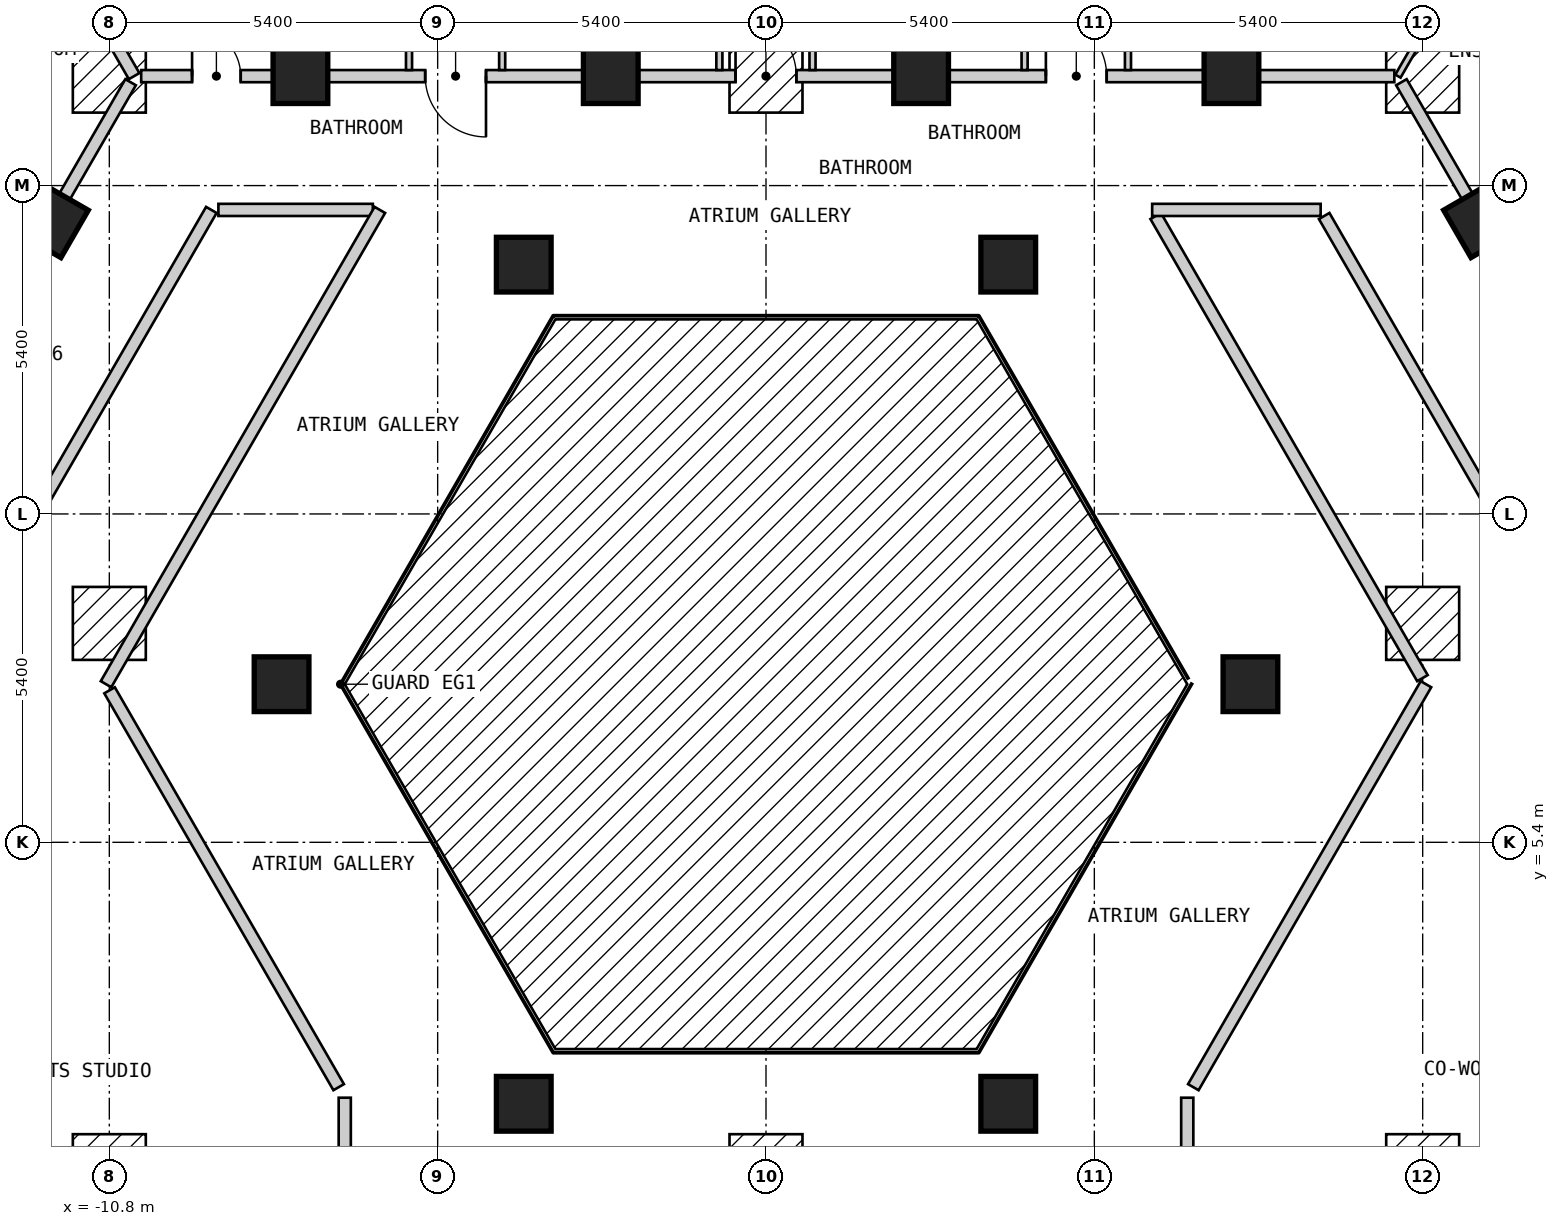
"""IFC4 building model, lengths in metres.
Left out: names, types, materials, properties, quantities, classifications, styles, units other than length and angle.
Written with IfcOpenShell. Run it as: python <this file> out.ifc"""

import sys

from ifc_helpers import new_model, si_unit, direction, frame, frame_2d, origin, origin_2d, place, context, subcontext, project, spatial, rectangle, extrude, element, fill, save


model = new_model("IFC4")
c1 = context("Model", 3, precision=1e-05, world=origin(), true_north=direction((0.0, 1.0)))
c2 = subcontext(c1, "Body", "Model", "MODEL_VIEW")
j1 = project(units=[si_unit("LENGTHUNIT", "METRE"), si_unit("PLANEANGLEUNIT", "RADIAN")], contexts=[c1])
p1 = place(None, origin())
s1 = spatial("IfcSite", under=j1, at=p1, CompositionType="ELEMENT")
p2 = place(p1, origin())
s2 = spatial("IfcBuilding", under=s1, at=p2, CompositionType="ELEMENT")
p3 = place(p2, frame((0.0, 0.0, 23.4)))
s3 = spatial("IfcBuildingStorey", under=s2, at=p3, CompositionType="ELEMENT", Elevation=23.4)
for number, where, z_axis, x_axis in (
    (1, (3.984, 1.1, 0.0), (0.0, 0.0, 1.0), (1.0, 0.0, 0.0)),
    (2, (7.967, 8.0, 0.0), (0.0, 0.0, 1.0), (1.0, 0.0, 0.0)),
    (3, (11.76, 15.631, 0.0), (0.0, 0.0, 1.0), (-0.5, 0.866, 0.0)),
    (4, (7.655, 18.0, 0.0), (0.0, 0.0, 1.0), (-1.0, 0.0, 0.0)),
    (5, (3.984, 14.9, 0.0), (0.0, 0.0, 1.0), (1.0, 0.0, 0.0)),
    (6, (2.551, 18.0, 0.0), (0.0, 0.0, 1.0), (-1.0, 0.0, 0.0)),
    (7, (-2.553, 18.0, 0.0), (0.0, 0.0, 1.0), (-1.0, 0.0, 0.0)),
    (8, (-3.984, 14.9, 0.0), (0.0, 0.0, 1.0), (1.0, 0.0, 0.0)),
    (9, (-7.657, 18.0, 0.0), (0.0, 0.0, 1.0), (-1.0, 0.0, 0.0)),
    (10, (-11.761, 15.63, 0.0), (0.0, 0.0, 1.0), (-0.5, -0.866, 0.0)),
    (11, (-7.967, 8.0, 0.0), (0.0, 0.0, 1.0), (1.0, 0.0, 0.0)),
    (12, (-3.984, 1.1, 0.0), (0.0, 0.0, 1.0), (1.0, 0.0, 0.0)),
):
    element("IfcColumn", number, at=place(p3, frame(where, z_axis=z_axis, x_axis=x_axis)), inside=s3, PredefinedType="COLUMN", context=c2, shape_type="SweptSolid", body=[
        extrude(rectangle(XDim=0.9, YDim=0.9, at=origin_2d()), origin(), (0.0, 0.0, 1.0), 3.0),
    ])
p4 = place(p3, frame((-10.796, 7.9, 0.0), z_axis=(0.0, 0.0, 1.0), x_axis=(0.499954271211, -0.866051803703, 0.0)))
e13 = element("IfcWall", 13, at=p4, inside=s3, PredefinedType="PARTITIONING", context=c2, shape_type="SweptSolid", body=[
    extrude(rectangle(XDim=7.536, YDim=0.2, at=frame_2d((3.768, 0.0))), origin(), (0.0, 0.0, 1.0), 2.7),
])
p5 = place(p3, frame((6.409, 15.7, 0.0), z_axis=(0.0, 0.0, 1.0), x_axis=(0.499930377127, -0.866065596838, 0.0)))
e14 = element("IfcWall", 14, at=p5, inside=s3, PredefinedType="PARTITIONING", context=c2, shape_type="SweptSolid", body=[
    extrude(rectangle(XDim=8.775, YDim=0.2, at=frame_2d((4.388, 0.0))), origin(), (0.0, 0.0, 1.0), 2.7),
])
p6 = place(p3, frame((9.18, 15.7, 0.0), z_axis=(0.0, 0.0, 1.0), x_axis=(0.500003652032, -0.866023295272, 0.0)))
e15 = element("IfcWall", 15, at=p6, inside=s3, PredefinedType="PARTITIONING", context=c2, shape_type="SweptSolid", body=[
    extrude(rectangle(XDim=18.012, YDim=0.2, at=frame_2d((9.006, 0.0))), origin(), (0.0, 0.0, 1.0), 2.7),
])
p7 = place(p6, frame((8.556, 0.0, 0.0)))
e16 = element("IfcOpeningElement", 16, at=p7, cuts=e15, PredefinedType="OPENING", context=c2, shape_type="SweptSolid", body=[
    extrude(rectangle(XDim=0.9, YDim=2.1, at=frame_2d((0.45, 1.05))), frame((0.0, 0.11, 0.0), z_axis=(0.0, -1.0, 0.0), x_axis=(1.0, 0.0, 0.0)), (0.0, 0.0, 1.0), 0.22),
])
p8 = place(p3, frame((10.45, 17.9, 0.0), z_axis=(0.0, 0.0, 1.0), x_axis=(0.500034352617, -0.866005569383, 0.0)))
e17 = element("IfcWall", 17, at=p8, inside=s3, PredefinedType="PARTITIONING", context=c2, shape_type="SweptSolid", body=[
    extrude(rectangle(XDim=20.553, YDim=0.2, at=frame_2d((10.276, 0.0))), origin(), (0.0, 0.0, 1.0), 2.7),
])
p9 = place(p8, frame((14.903, 0.0, 0.0)))
e18 = element("IfcOpeningElement", 18, at=p9, cuts=e17, PredefinedType="OPENING", context=c2, shape_type="SweptSolid", body=[
    extrude(rectangle(XDim=1.0, YDim=2.1, at=frame_2d((0.5, 1.05))), frame((0.0, 0.11, 0.0), z_axis=(0.0, -1.0, 0.0), x_axis=(1.0, 0.0, 0.0)), (0.0, 0.0, 1.0), 0.22),
])
p10 = place(p8, frame((9.775, 0.0, 0.0)))
e19 = element("IfcOpeningElement", 19, at=p10, cuts=e17, PredefinedType="OPENING", context=c2, shape_type="SweptSolid", body=[
    extrude(rectangle(XDim=1.0, YDim=2.1, at=frame_2d((0.5, 1.05))), frame((0.0, 0.11, 0.0), z_axis=(0.0, -1.0, 0.0), x_axis=(1.0, 0.0, 0.0)), (0.0, 0.0, 1.0), 0.22),
])
p11 = place(p3, frame((-9.006, 15.8, 0.0), z_axis=(0.0, 0.0, 1.0), x_axis=(1.0, 0.0, 0.0)))
e20 = element("IfcWall", 20, at=p11, inside=s3, PredefinedType="PARTITIONING", context=c2, shape_type="SweptSolid", body=[
    extrude(rectangle(XDim=2.54, YDim=0.2, at=frame_2d((1.27, 0.0))), origin(), (0.0, 0.0, 1.0), 2.7),
])
p12 = place(p3, frame((6.351, 15.8, 0.0), z_axis=(0.0, 0.0, 1.0), x_axis=(1.0, 0.0, 0.0)))
e21 = element("IfcWall", 21, at=p12, inside=s3, PredefinedType="PARTITIONING", context=c2, shape_type="SweptSolid", body=[
    extrude(rectangle(XDim=2.771, YDim=0.2, at=frame_2d((1.385, 0.0))), origin(), (0.0, 0.0, 1.0), 2.7),
])
p13 = place(p3, frame((-10.276, 18.0, 0.0), z_axis=(0.0, 0.0, 1.0), x_axis=(1.0, 0.0, 0.0)))
e22 = element("IfcWall", 22, at=p13, inside=s3, PredefinedType="PARTITIONING", context=c2, shape_type="SweptSolid", body=[
    extrude(rectangle(XDim=20.61, YDim=0.2, at=frame_2d((10.305, 0.0))), origin(), (0.0, 0.0, 1.0), 2.7),
])
p14 = place(p13, frame((14.879, 0.0, 0.0)))
e23 = element("IfcOpeningElement", 23, at=p14, cuts=e22, PredefinedType="OPENING", context=c2, shape_type="SweptSolid", body=[
    extrude(rectangle(XDim=1.0, YDim=2.1, at=frame_2d((0.5, 1.05))), frame((0.0, 0.11, 0.0), z_axis=(0.0, -1.0, 0.0), x_axis=(1.0, 0.0, 0.0)), (0.0, 0.0, 1.0), 0.22),
])
p15 = place(p13, frame((9.775, 0.0, 0.0)))
e24 = element("IfcOpeningElement", 24, at=p15, cuts=e22, PredefinedType="OPENING", context=c2, shape_type="SweptSolid", body=[
    extrude(rectangle(XDim=1.0, YDim=2.1, at=frame_2d((0.5, 1.05))), frame((0.0, 0.11, 0.0), z_axis=(0.0, -1.0, 0.0), x_axis=(1.0, 0.0, 0.0)), (0.0, 0.0, 1.0), 0.22),
])
p16 = place(p13, frame((4.671, 0.0, 0.0)))
e25 = element("IfcOpeningElement", 25, at=p16, cuts=e22, PredefinedType="OPENING", context=c2, shape_type="SweptSolid", body=[
    extrude(rectangle(XDim=1.0, YDim=2.1, at=frame_2d((0.5, 1.05))), frame((0.0, 0.11, 0.0), z_axis=(0.0, -1.0, 0.0), x_axis=(1.0, 0.0, 0.0)), (0.0, 0.0, 1.0), 0.22),
])
p17 = place(p13, frame((0.837, 0.0, 0.0)))
e26 = element("IfcOpeningElement", 26, at=p17, cuts=e22, PredefinedType="OPENING", context=c2, shape_type="SweptSolid", body=[
    extrude(rectangle(XDim=0.8, YDim=2.1, at=frame_2d((0.4, 1.05))), frame((0.0, 0.11, 0.0), z_axis=(0.0, -1.0, 0.0), x_axis=(1.0, 0.0, 0.0)), (0.0, 0.0, 1.0), 0.22),
])
p18 = place(p3, frame((7.028, 1.373, 0.0), z_axis=(0.0, 0.0, 1.0), x_axis=(0.49998574534, 0.86603363356, 0.0)))
e27 = element("IfcWall", 27, at=p18, inside=s3, PredefinedType="PARTITIONING", context=c2, shape_type="SweptSolid", body=[
    extrude(rectangle(XDim=7.652, YDim=0.2, at=frame_2d((3.826, 0.0))), origin(), (0.0, 0.0, 1.0), 2.7),
])
p19 = place(p3, frame((-10.854, 8.0, 0.0), z_axis=(0.0, 0.0, 1.0), x_axis=(0.499964141897, 0.86604610548, 0.0)))
e28 = element("IfcWall", 28, at=p19, inside=s3, PredefinedType="PARTITIONING", context=c2, shape_type="SweptSolid", body=[
    extrude(rectangle(XDim=9.007, YDim=0.2, at=frame_2d((4.503, 0.0))), origin(), (0.0, 0.0, 1.0), 2.7),
])
p20 = place(p3, frame((-18.244, -0.001, 0.0), z_axis=(0.0, 0.0, 1.0), x_axis=(0.499962999376, 0.866046765051, 0.0)))
e29 = element("IfcWall", 29, at=p20, inside=s3, PredefinedType="PARTITIONING", context=c2, shape_type="SweptSolid", body=[
    extrude(rectangle(XDim=18.245, YDim=0.2, at=frame_2d((9.123, 0.0))), origin(), (0.0, 0.0, 1.0), 2.7),
])
p21 = place(p20, frame((8.672, 0.0, 0.0)))
e30 = element("IfcOpeningElement", 30, at=p21, cuts=e29, PredefinedType="OPENING", context=c2, shape_type="SweptSolid", body=[
    extrude(rectangle(XDim=0.9, YDim=2.1, at=frame_2d((0.45, 1.05))), frame((0.0, 0.11, 0.0), z_axis=(0.0, -1.0, 0.0), x_axis=(1.0, 0.0, 0.0)), (0.0, 0.0, 1.0), 0.22),
])
p22 = place(p3, frame((-20.727, 0.099, 0.0), z_axis=(0.0, 0.0, 1.0), x_axis=(0.499993204491, 0.866029327138, 0.0)))
e31 = element("IfcWall", 31, at=p22, inside=s3, PredefinedType="PARTITIONING", context=c2, shape_type="SweptSolid", body=[
    extrude(rectangle(XDim=20.554, YDim=0.2, at=frame_2d((10.277, 0.0))), origin(), (0.0, 0.0, 1.0), 2.7),
])
p23 = place(p22, frame((14.88, 0.0, 0.0)))
e32 = element("IfcOpeningElement", 32, at=p23, cuts=e31, PredefinedType="OPENING", context=c2, shape_type="SweptSolid", body=[
    extrude(rectangle(XDim=1.0, YDim=2.1, at=frame_2d((0.5, 1.05))), frame((0.0, 0.11, 0.0), z_axis=(0.0, -1.0, 0.0), x_axis=(1.0, 0.0, 0.0)), (0.0, 0.0, 1.0), 0.22),
])
p24 = place(p22, frame((4.673, 0.0, 0.0)))
e33 = element("IfcOpeningElement", 33, at=p24, cuts=e31, PredefinedType="OPENING", context=c2, shape_type="SweptSolid", body=[
    extrude(rectangle(XDim=1.0, YDim=2.1, at=frame_2d((0.5, 1.05))), frame((0.0, 0.11, 0.0), z_axis=(0.0, -1.0, 0.0), x_axis=(1.0, 0.0, 0.0)), (0.0, 0.0, 1.0), 0.22),
])
for number, where, z_axis, x_axis in (
    (34, (6.928, -2.8, 0.0), (0.0, 0.0, 1.0), (0.0, 1.0, 0.0)),
    (35, (-6.928, -2.8, 0.0), (0.0, 0.0, 1.0), (0.0, 1.0, 0.0)),
):
    element("IfcWall", number, at=place(p3, frame(where, z_axis=z_axis, x_axis=x_axis)), inside=s3, PredefinedType="PARTITIONING", context=c2, shape_type="SweptSolid", body=[
        extrude(rectangle(XDim=4.0, YDim=0.2, at=frame_2d((2.0, 0.0))), origin(), (0.0, 0.0, 1.0), 2.7),
    ])
p25 = place(p3, frame((-4.339, 20.609, 0.0), z_axis=(0.0, 0.0, 1.0), x_axis=(0.0, -1.0, 0.0)))
e36 = element("IfcWall", 36, at=p25, inside=s3, PredefinedType="PARTITIONING", context=c2, shape_type="SweptSolid", body=[
    extrude(rectangle(XDim=2.509, YDim=0.1, at=frame_2d((1.254, 0.0))), origin(), (0.0, 0.0, 1.0), 2.7),
])
p26 = place(p25, frame((0.829, 0.0, 0.0)))
e37 = element("IfcOpeningElement", 37, at=p26, cuts=e36, PredefinedType="OPENING", context=c2, shape_type="SweptSolid", body=[
    extrude(rectangle(XDim=0.9, YDim=2.1, at=frame_2d((0.45, 1.05))), frame((0.0, 0.06, 0.0), z_axis=(0.0, -1.0, 0.0), x_axis=(1.0, 0.0, 0.0)), (0.0, 0.0, 1.0), 0.12),
])
p27 = place(p3, frame((10.393, 18.0, 0.0), z_axis=(0.0, 0.0, 1.0), x_axis=(0.499945497007, 0.866056868816, 0.0)))
e38 = element("IfcWall", 38, at=p27, inside=s3, PredefinedType="PARTITIONING", context=c2, shape_type="SweptSolid", body=[
    extrude(rectangle(XDim=10.265, YDim=0.1, at=frame_2d((5.132, 0.0))), origin(), (0.0, 0.0, 1.0), 2.7),
])
p28 = place(p27, frame((7.108, 0.0, 0.0)))
e39 = element("IfcOpeningElement", 39, at=p28, cuts=e38, PredefinedType="OPENING", context=c2, shape_type="SweptSolid", body=[
    extrude(rectangle(XDim=0.9, YDim=2.1, at=frame_2d((0.45, 1.05))), frame((0.0, 0.06, 0.0), z_axis=(0.0, -1.0, 0.0), x_axis=(1.0, 0.0, 0.0)), (0.0, 0.0, 1.0), 0.12),
])
p29 = place(p3, frame((4.253, 18.1, 0.0), z_axis=(0.0, 0.0, 1.0), x_axis=(0.0, 1.0, 0.0)))
e40 = element("IfcWall", 40, at=p29, inside=s3, PredefinedType="PARTITIONING", context=c2, shape_type="SweptSolid", body=[
    extrude(rectangle(XDim=4.05, YDim=0.1, at=frame_2d((2.025, 0.0))), origin(), (0.0, 0.0, 1.0), 2.7),
])
p30 = place(p29, frame((1.6, 0.0, 0.0)))
e41 = element("IfcOpeningElement", 41, at=p30, cuts=e40, PredefinedType="OPENING", context=c2, shape_type="SweptSolid", body=[
    extrude(rectangle(XDim=0.8, YDim=2.1, at=frame_2d((0.4, 1.05))), frame((0.0, 0.06, 0.0), z_axis=(0.0, -1.0, 0.0), x_axis=(1.0, 0.0, 0.0)), (0.0, 0.0, 1.0), 0.12),
])
p31 = place(p3, frame((5.953, 18.1, 0.0), z_axis=(0.0, 0.0, 1.0), x_axis=(0.0, 1.0, 0.0)))
e42 = element("IfcWall", 42, at=p31, inside=s3, PredefinedType="PARTITIONING", context=c2, shape_type="SweptSolid", body=[
    extrude(rectangle(XDim=4.05, YDim=0.1, at=frame_2d((2.025, 0.0))), origin(), (0.0, 0.0, 1.0), 2.7),
])
p32 = place(p31, frame((1.55, 0.0, 0.0)))
e43 = element("IfcOpeningElement", 43, at=p32, cuts=e42, PredefinedType="OPENING", context=c2, shape_type="SweptSolid", body=[
    extrude(rectangle(XDim=0.9, YDim=2.1, at=frame_2d((0.45, 1.05))), frame((0.0, 0.06, 0.0), z_axis=(0.0, -1.0, 0.0), x_axis=(1.0, 0.0, 0.0)), (0.0, 0.0, 1.0), 0.12),
])
p33 = place(p3, frame((0.765, 18.1, 0.0), z_axis=(0.0, 0.0, 1.0), x_axis=(0.0, 1.0, 0.0)))
e44 = element("IfcWall", 44, at=p33, inside=s3, PredefinedType="PARTITIONING", context=c2, shape_type="SweptSolid", body=[
    extrude(rectangle(XDim=2.91, YDim=0.1, at=frame_2d((1.455, 0.0))), origin(), (0.0, 0.0, 1.0), 2.7),
])
p34 = place(p33, frame((1.03, 0.0, 0.0)))
e45 = element("IfcOpeningElement", 45, at=p34, cuts=e44, PredefinedType="OPENING", context=c2, shape_type="SweptSolid", body=[
    extrude(rectangle(XDim=0.8, YDim=2.1, at=frame_2d((0.4, 1.05))), frame((0.0, 0.06, 0.0), z_axis=(0.0, -1.0, 0.0), x_axis=(1.0, 0.0, 0.0)), (0.0, 0.0, 1.0), 0.12),
])
p35 = place(p3, frame((7.655, 18.1, 0.0), z_axis=(0.0, 0.0, 1.0), x_axis=(0.0, 1.0, 0.0)))
e46 = element("IfcWall", 46, at=p35, inside=s3, PredefinedType="PARTITIONING", context=c2, shape_type="SweptSolid", body=[
    extrude(rectangle(XDim=4.1, YDim=0.1, at=frame_2d((2.05, 0.0))), origin(), (0.0, 0.0, 1.0), 2.7),
])
p36 = place(p3, frame((-5.871, 18.1, 0.0), z_axis=(0.0, 0.0, 1.0), x_axis=(0.0, 1.0, 0.0)))
e47 = element("IfcWall", 47, at=p36, inside=s3, PredefinedType="PARTITIONING", context=c2, shape_type="SweptSolid", body=[
    extrude(rectangle(XDim=2.51, YDim=0.1, at=frame_2d((1.255, 0.0))), origin(), (0.0, 0.0, 1.0), 2.7),
])
p37 = place(p36, frame((0.83, 0.0, 0.0)))
e48 = element("IfcOpeningElement", 48, at=p37, cuts=e47, PredefinedType="OPENING", context=c2, shape_type="SweptSolid", body=[
    extrude(rectangle(XDim=0.8, YDim=2.1, at=frame_2d((0.4, 1.05))), frame((0.0, 0.06, 0.0), z_axis=(0.0, -1.0, 0.0), x_axis=(1.0, 0.0, 0.0)), (0.0, 0.0, 1.0), 0.12),
])
p38 = place(p3, frame((-0.767, 18.1, 0.0), z_axis=(0.0, 0.0, 1.0), x_axis=(0.0, 1.0, 0.0)))
e49 = element("IfcWall", 49, at=p38, inside=s3, PredefinedType="PARTITIONING", context=c2, shape_type="SweptSolid", body=[
    extrude(rectangle(XDim=2.959, YDim=0.1, at=frame_2d((1.479, 0.0))), origin(), (0.0, 0.0, 1.0), 2.7),
])
p39 = place(p38, frame((0.98, 0.0, 0.0)))
e50 = element("IfcOpeningElement", 50, at=p39, cuts=e49, PredefinedType="OPENING", context=c2, shape_type="SweptSolid", body=[
    extrude(rectangle(XDim=0.9, YDim=2.1, at=frame_2d((0.45, 1.05))), frame((0.0, 0.06, 0.0), z_axis=(0.0, -1.0, 0.0), x_axis=(1.0, 0.0, 0.0)), (0.0, 0.0, 1.0), 0.12),
])
p40 = place(p3, frame((-12.661, 21.93, 0.0), z_axis=(0.0, 0.0, 1.0), x_axis=(0.499975495332, -0.866039551099, 0.0)))
e51 = element("IfcWall", 51, at=p40, inside=s3, PredefinedType="PARTITIONING", context=c2, shape_type="SweptSolid", body=[
    extrude(rectangle(XDim=4.538, YDim=0.2, at=frame_2d((2.269, 0.0))), origin(), (0.0, 0.0, 1.0), 2.7),
])
for number, where, z_axis, x_axis in (
    (52, (-2.553, 28.1, 0.0), (0.0, 0.0, 1.0), (0.0, -1.0, 0.0)),
    (53, (2.551, 18.1, 0.0), (0.0, 0.0, 1.0), (0.0, 1.0, 0.0)),
):
    element("IfcWall", number, at=place(p3, frame(where, z_axis=z_axis, x_axis=x_axis)), inside=s3, PredefinedType="PARTITIONING", context=c2, shape_type="SweptSolid", body=[
        extrude(rectangle(XDim=10.0, YDim=0.2, at=frame_2d((5.0, 0.0))), origin(), (0.0, 0.0, 1.0), 2.7),
    ])
p41 = place(p3, frame((-7.657, 18.1, 0.0), z_axis=(0.0, 0.0, 1.0), x_axis=(0.0, 1.0, 0.0)))
e54 = element("IfcWall", 54, at=p41, inside=s3, PredefinedType="PARTITIONING", context=c2, shape_type="SweptSolid", body=[
    extrude(rectangle(XDim=2.56, YDim=0.2, at=frame_2d((1.28, 0.0))), origin(), (0.0, 0.0, 1.0), 2.7),
])
p42 = place(p14, origin())
e55 = element("IfcDoor", 55, at=p42, inside=s3, OperationType="SINGLE_SWING_LEFT", PredefinedType="DOOR", context=c2, shape_type="SweptSolid", body=[
    extrude(rectangle(XDim=1.0, YDim=2.1, at=frame_2d((0.5, 1.05))), frame((0.0, 0.025, 0.0), z_axis=(0.0, -1.0, 0.0), x_axis=(1.0, 0.0, 0.0)), (0.0, 0.0, 1.0), 0.05),
])
fill(e23, e55)
p43 = place(p15, origin())
e56 = element("IfcDoor", 56, at=p43, inside=s3, OperationType="SINGLE_SWING_LEFT", PredefinedType="DOOR", context=c2, shape_type="SweptSolid", body=[
    extrude(rectangle(XDim=1.0, YDim=2.1, at=frame_2d((0.5, 1.05))), frame((0.0, 0.025, 0.0), z_axis=(0.0, -1.0, 0.0), x_axis=(1.0, 0.0, 0.0)), (0.0, 0.0, 1.0), 0.05),
])
fill(e24, e56)
p44 = place(p16, origin())
e57 = element("IfcDoor", 57, at=p44, inside=s3, OperationType="SINGLE_SWING_RIGHT", PredefinedType="DOOR", context=c2, shape_type="SweptSolid", body=[
    extrude(rectangle(XDim=1.0, YDim=2.1, at=frame_2d((0.5, 1.05))), frame((0.0, 0.025, 0.0), z_axis=(0.0, -1.0, 0.0), x_axis=(1.0, 0.0, 0.0)), (0.0, 0.0, 1.0), 0.05),
])
fill(e25, e57)
p45 = place(p17, origin())
e58 = element("IfcDoor", 58, at=p45, inside=s3, OperationType="SINGLE_SWING_LEFT", PredefinedType="DOOR", context=c2, shape_type="SweptSolid", body=[
    extrude(rectangle(XDim=0.8, YDim=2.1, at=frame_2d((0.4, 1.05))), frame((0.0, 0.025, 0.0), z_axis=(0.0, -1.0, 0.0), x_axis=(1.0, 0.0, 0.0)), (0.0, 0.0, 1.0), 0.05),
])
fill(e26, e58)
save(model, sys.argv[1])
